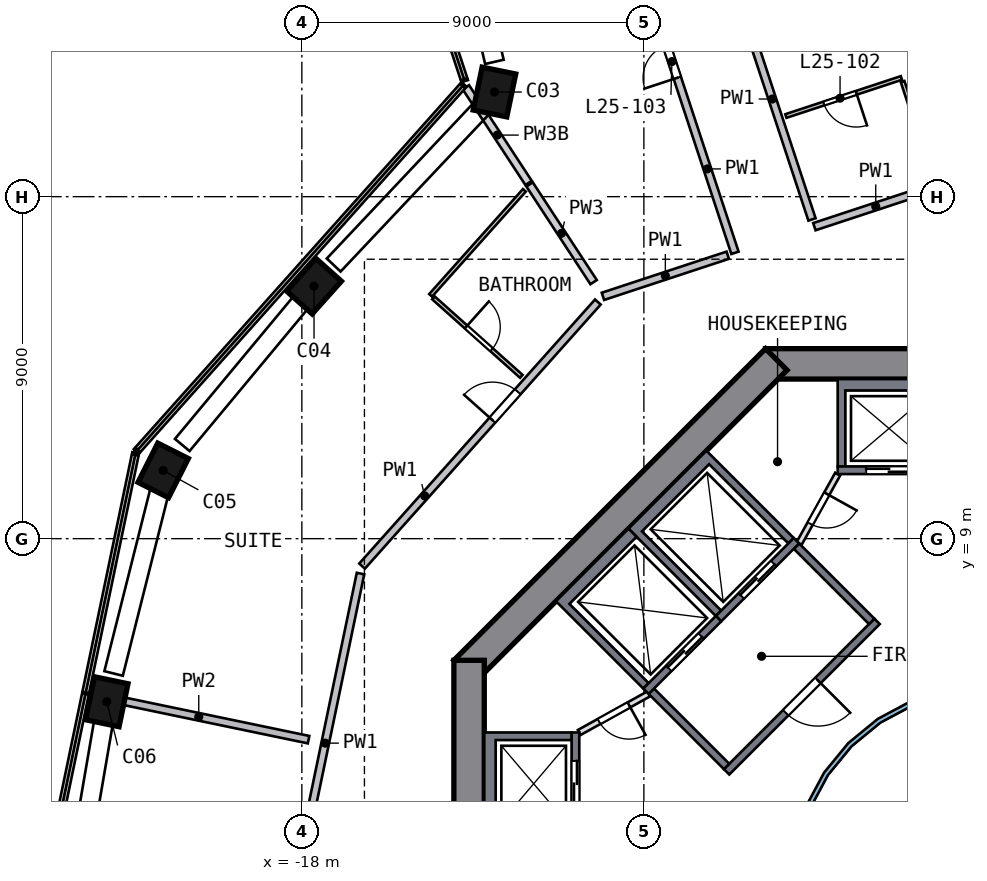
"""IFC4 building model, lengths in metres.
Left out: names, types, materials, properties, quantities, classifications, styles, units other than length and angle.
Written with IfcOpenShell. Run it as: python <this file> out.ifc"""

import sys

from ifc_helpers import new_model, si_unit, direction, frame, frame_2d, origin, origin_2d, place, context, subcontext, project, spatial, polyline, rectangle, outline, extrude, element, fill, save


model = new_model("IFC4")
c1 = context("Model", 3, precision=1e-05, world=origin(), true_north=direction((0.0, 1.0)))
c2 = subcontext(c1, "Body", "Model", "MODEL_VIEW")
j1 = project(units=[si_unit("LENGTHUNIT", "METRE"), si_unit("PLANEANGLEUNIT", "RADIAN")], contexts=[c1])
p1 = place(None, origin())
s1 = spatial("IfcSite", under=j1, at=p1, CompositionType="ELEMENT")
p2 = place(p1, origin())
s2 = spatial("IfcBuilding", under=s1, at=p2, CompositionType="ELEMENT")
p3 = place(p2, frame((0.0, 0.0, 107.0)))
s3 = spatial("IfcBuildingStorey", under=s2, at=p3, CompositionType="ELEMENT", Elevation=107.0)
p4 = place(p3, frame((-12.839, 20.812, 0.0), z_axis=(-0.076771245, -0.048279423, 0.995879146), x_axis=(0.199145695, 0.977958003, 0.062762546)))
e1 = element("IfcColumn", 1, at=p4, inside=s3, PredefinedType="COLUMN", context=c2, shape_type="SweptSolid", body=[
    extrude(rectangle(XDim=1.15, YDim=0.9, at=origin_2d()), origin(), (0.0, 0.0, 1.0), 4.207),
])
p5 = place(p3, frame((-17.61, 15.723, 0.0), z_axis=(-0.057812061, -0.065822166, 0.996155213), x_axis=(-0.663669485, -0.742878568, -0.087602791)))
e2 = element("IfcColumn", 2, at=p5, inside=s3, PredefinedType="COLUMN", context=c2, shape_type="SweptSolid", body=[
    extrude(rectangle(XDim=1.15, YDim=0.9, at=origin_2d()), origin(), (0.0, 0.0, 1.0), 4.206),
])
p6 = place(p3, frame((-21.602, 10.893, 0.0), z_axis=(-0.039752787, -0.080434106, 0.995966902), x_axis=(0.448806667, 0.889113725, 0.089718226)))
e3 = element("IfcColumn", 3, at=p6, inside=s3, PredefinedType="COLUMN", context=c2, shape_type="SweptSolid", body=[
    extrude(rectangle(XDim=1.15, YDim=0.9, at=origin_2d()), origin(), (0.0, 0.0, 1.0), 4.207),
])
p7 = place(p3, frame((-23.113, 4.812, 0.0), z_axis=(-0.017123066, -0.085905551, 0.996156131), x_axis=(-0.20296904, -0.975259529, -0.087592353)))
e4 = element("IfcColumn", 4, at=p7, inside=s3, PredefinedType="COLUMN", context=c2, shape_type="SweptSolid", body=[
    extrude(rectangle(XDim=1.15, YDim=0.9, at=origin_2d()), origin(), (0.0, 0.0, 1.0), 4.206),
])
p8 = place(p3, frame((5.799, 13.6, 0.0), z_axis=(0.0, 0.0, 1.0), x_axis=(-1.0, 0.0, 0.0)))
e5 = element("IfcWall", 5, at=p8, inside=s3, PredefinedType="SHEAR", context=c2, shape_type="SweptSolid", body=[
    extrude(rectangle(XDim=11.598, YDim=0.8, at=frame_2d((5.799, 0.0))), origin(), (0.0, 0.0, 1.0), 4.5),
])
p9 = place(p8, frame((4.899, 0.0, 0.0)))
e6 = element("IfcOpeningElement", 6, at=p9, cuts=e5, PredefinedType="OPENING", context=c2, shape_type="SweptSolid", body=[
    extrude(rectangle(XDim=1.8, YDim=2.1, at=frame_2d((0.9, 1.05))), frame((0.0, 0.41, 0.0), z_axis=(0.0, -1.0, 0.0), x_axis=(1.0, 0.0, 0.0)), (0.0, 0.0, 1.0), 0.82),
])
p10 = place(p3, frame((-5.516, 13.717, 0.0), z_axis=(0.0, 0.0, 1.0), x_axis=(-0.707106781, -0.707106781, 0.0)))
e7 = element("IfcWall", 7, at=p10, inside=s3, PredefinedType="SHEAR", context=c2, shape_type="SweptSolid", body=[
    extrude(rectangle(XDim=11.598, YDim=0.8, at=frame_2d((5.799, 0.0))), origin(), (0.0, 0.0, 1.0), 4.5),
])
p11 = place(p3, frame((-13.6, 5.799, 0.0), z_axis=(0.0, 0.0, 1.0), x_axis=(0.0, -1.0, 0.0)))
e8 = element("IfcWall", 8, at=p11, inside=s3, PredefinedType="SHEAR", context=c2, shape_type="SweptSolid", body=[
    extrude(rectangle(XDim=11.598, YDim=0.8, at=frame_2d((5.799, 0.0))), origin(), (0.0, 0.0, 1.0), 4.5),
])
p12 = place(p11, frame((4.899, 0.0, 0.0)))
e9 = element("IfcOpeningElement", 9, at=p12, cuts=e8, PredefinedType="OPENING", context=c2, shape_type="SweptSolid", body=[
    extrude(rectangle(XDim=1.8, YDim=2.1, at=frame_2d((0.9, 1.05))), frame((0.0, 0.41, 0.0), z_axis=(0.0, -1.0, 0.0), x_axis=(1.0, 0.0, 0.0)), (0.0, 0.0, 1.0), 0.82),
])
p13 = place(p3, origin())
e10 = element("IfcWall", 10, at=p13, inside=s3, PredefinedType="SOLIDWALL", context=c2, shape_type="SweptSolid", body=[
    extrude(outline(polyline([(-3.9, 10.9), (-3.9, 13.2), (-1.2, 13.2), (-1.2, 10.9), (-1.4, 10.9), (-1.4, 12.9), (-3.7, 12.9), (-3.7, 10.9), (-3.9, 10.9)])), origin(), (0.0, 0.0, 1.0), 4.19),
])
p14 = place(p3, frame((-1.2, 10.8, 0.0), z_axis=(0.0, 0.0, 1.0), x_axis=(-1.0, 0.0, 0.0)))
e11 = element("IfcWall", 11, at=p14, inside=s3, PredefinedType="SOLIDWALL", context=c2, shape_type="SweptSolid", body=[
    extrude(rectangle(XDim=2.7, YDim=0.2, at=frame_2d((1.35, 0.0))), origin(), (0.0, 0.0, 1.0), 4.19),
])
p15 = place(p14, frame((0.75, 0.0, 0.0)))
e12 = element("IfcOpeningElement", 12, at=p15, cuts=e11, PredefinedType="OPENING", context=c2, shape_type="SweptSolid", body=[
    extrude(rectangle(XDim=1.2, YDim=2.1, at=frame_2d((0.6, 1.05))), frame((0.0, 0.11, 0.0), z_axis=(0.0, -1.0, 0.0), x_axis=(1.0, 0.0, 0.0)), (0.0, 0.0, 1.0), 0.22),
])
p16 = place(p3, origin())
e13 = element("IfcWall", 13, at=p16, inside=s3, PredefinedType="SOLIDWALL", context=c2, shape_type="SweptSolid", body=[
    extrude(outline(polyline([(-13.2, 3.9), (-10.9, 3.9), (-10.9, 3.7), (-12.9, 3.7), (-12.9, 1.4), (-10.9, 1.4), (-10.9, 1.2), (-13.2, 1.2), (-13.2, 3.9)])), origin(), (0.0, 0.0, 1.0), 4.19),
])
p17 = place(p3, frame((-10.8, 1.2, 0.0), z_axis=(0.0, 0.0, 1.0), x_axis=(0.0, 1.0, 0.0)))
e14 = element("IfcWall", 14, at=p17, inside=s3, PredefinedType="SOLIDWALL", context=c2, shape_type="SweptSolid", body=[
    extrude(rectangle(XDim=2.7, YDim=0.2, at=frame_2d((1.35, 0.0))), origin(), (0.0, 0.0, 1.0), 4.19),
])
p18 = place(p17, frame((0.75, 0.0, 0.0)))
e15 = element("IfcOpeningElement", 15, at=p18, cuts=e14, PredefinedType="OPENING", context=c2, shape_type="SweptSolid", body=[
    extrude(rectangle(XDim=1.2, YDim=2.1, at=frame_2d((0.6, 1.05))), frame((0.0, 0.11, 0.0), z_axis=(0.0, -1.0, 0.0), x_axis=(1.0, 0.0, 0.0)), (0.0, 0.0, 1.0), 0.22),
])
p19 = place(p3, origin())
e16 = element("IfcWall", 16, at=p19, inside=s3, PredefinedType="SOLIDWALL", context=c2, shape_type="SweptSolid", body=[
    extrude(outline(polyline([(-9.405, 9.263), (-7.354, 11.314), (-5.056, 9.016), (-5.197, 8.874), (-7.283, 10.96), (-9.051, 9.192), (-6.965, 7.106), (-7.106, 6.965), (-9.405, 9.263)])), origin(), (0.0, 0.0, 1.0), 4.19),
])
p20 = place(p3, frame((-4.985, 8.945, 0.0), z_axis=(0.0, 0.0, 1.0), x_axis=(-0.707106781, -0.707106781, 0.0)))
e17 = element("IfcWall", 17, at=p20, inside=s3, PredefinedType="SOLIDWALL", context=c2, shape_type="SweptSolid", body=[
    extrude(rectangle(XDim=2.9, YDim=0.2, at=frame_2d((1.45, 0.0))), origin(), (0.0, 0.0, 1.0), 4.19),
])
p21 = place(p20, frame((0.85, 0.0, 0.0)))
e18 = element("IfcOpeningElement", 18, at=p21, cuts=e17, PredefinedType="OPENING", context=c2, shape_type="SweptSolid", body=[
    extrude(rectangle(XDim=1.2, YDim=2.1, at=frame_2d((0.6, 1.05))), frame((0.0, 0.11, 0.0), z_axis=(0.0, -1.0, 0.0), x_axis=(1.0, 0.0, 0.0)), (0.0, 0.0, 1.0), 0.22),
])
p22 = place(p3, origin())
e19 = element("IfcWall", 19, at=p22, inside=s3, PredefinedType="SOLIDWALL", context=c2, shape_type="SweptSolid", body=[
    extrude(outline(polyline([(-11.314, 7.354), (-9.405, 9.263), (-9.192, 9.051), (-10.96, 7.283), (-8.874, 5.197), (-9.016, 5.056), (-11.314, 7.354)])), origin(), (0.0, 0.0, 1.0), 4.19),
])
p23 = place(p3, frame((-7.036, 6.894, 0.0), z_axis=(0.0, 0.0, 1.0), x_axis=(-0.707106781, -0.707106781, 0.0)))
e20 = element("IfcWall", 20, at=p23, inside=s3, PredefinedType="SOLIDWALL", context=c2, shape_type="SweptSolid", body=[
    extrude(rectangle(XDim=2.7, YDim=0.2, at=frame_2d((1.35, 0.0))), origin(), (0.0, 0.0, 1.0), 4.19),
])
p24 = place(p23, frame((0.65, 0.0, 0.0)))
e21 = element("IfcOpeningElement", 21, at=p24, cuts=e20, PredefinedType="OPENING", context=c2, shape_type="SweptSolid", body=[
    extrude(rectangle(XDim=1.2, YDim=2.1, at=frame_2d((0.6, 1.05))), frame((0.0, 0.11, 0.0), z_axis=(0.0, -1.0, 0.0), x_axis=(1.0, 0.0, 0.0)), (0.0, 0.0, 1.0), 0.22),
])
p25 = place(p3, frame((-2.864, 6.823, 0.0), z_axis=(0.0, 0.0, 1.0), x_axis=(-0.707106781, -0.707106781, 0.0)))
e22 = element("IfcWall", 22, at=p25, inside=s3, PredefinedType="SOLIDWALL", context=c2, shape_type="SweptSolid", body=[
    extrude(rectangle(XDim=5.6, YDim=0.2, at=frame_2d((2.8, 0.0))), origin(), (0.0, 0.0, 1.0), 4.19),
])
p26 = place(p25, frame((2.2, 0.0, 0.0)))
e23 = element("IfcOpeningElement", 23, at=p26, cuts=e22, PredefinedType="OPENING", context=c2, shape_type="SweptSolid", body=[
    extrude(rectangle(XDim=1.2, YDim=2.1, at=frame_2d((0.6, 1.05))), frame((0.0, 0.11, 0.0), z_axis=(0.0, -1.0, 0.0), x_axis=(1.0, 0.0, 0.0)), (0.0, 0.0, 1.0), 0.22),
])
for number, where, z_axis, x_axis in (
    (24, (-3.005, 6.823, 0.0), (0.0, 0.0, 1.0), (-0.707, 0.707, 0.0)),
    (25, (-6.823, 3.005, 0.0), (0.0, 0.0, 1.0), (-0.707, 0.707, 0.0)),
):
    element("IfcWall", number, at=place(p3, frame(where, z_axis=z_axis, x_axis=x_axis)), inside=s3, PredefinedType="SOLIDWALL", context=c2, shape_type="SweptSolid", body=[
        extrude(rectangle(XDim=2.8, YDim=0.2, at=frame_2d((1.4, 0.0))), origin(), (0.0, 0.0, 1.0), 4.19),
    ])
p27 = place(p3, frame((-3.9, 10.7, 0.0), z_axis=(0.0, 0.0, 1.0), x_axis=(-0.485692555, -0.874129705, 0.0)))
e26 = element("IfcWall", 26, at=p27, inside=s3, PredefinedType="PARTITIONING", context=c2, shape_type="SweptSolid", body=[
    extrude(rectangle(XDim=2.089, YDim=0.15, at=frame_2d((1.044, 0.0))), origin(), (0.0, 0.0, 1.0), 4.19),
])
p28 = place(p27, frame((0.594, 0.0, 0.0)))
e27 = element("IfcOpeningElement", 27, at=p28, cuts=e26, PredefinedType="OPENING", context=c2, shape_type="SweptSolid", body=[
    extrude(rectangle(XDim=0.9, YDim=2.1, at=frame_2d((0.45, 1.05))), frame((0.0, 0.085, 0.0), z_axis=(0.0, -1.0, 0.0), x_axis=(1.0, 0.0, 0.0)), (0.0, 0.0, 1.0), 0.17),
])
p29 = place(p3, frame((-8.874, 4.914, 0.0), z_axis=(0.0, 0.0, 1.0), x_axis=(-0.874129705, -0.485692555, 0.0)))
e28 = element("IfcWall", 28, at=p29, inside=s3, PredefinedType="PARTITIONING", context=c2, shape_type="SweptSolid", body=[
    extrude(rectangle(XDim=2.089, YDim=0.15, at=frame_2d((1.044, 0.0))), origin(), (0.0, 0.0, 1.0), 4.19),
])
p30 = place(p29, frame((0.594, 0.0, 0.0)))
e29 = element("IfcOpeningElement", 29, at=p30, cuts=e28, PredefinedType="OPENING", context=c2, shape_type="SweptSolid", body=[
    extrude(rectangle(XDim=0.9, YDim=2.1, at=frame_2d((0.45, 1.05))), frame((0.0, 0.085, 0.0), z_axis=(0.0, -1.0, 0.0), x_axis=(1.0, 0.0, 0.0)), (0.0, 0.0, 1.0), 0.17),
])
p31 = place(p3, origin())
e30 = element("IfcWall", 30, at=p31, inside=s3, PredefinedType="SOLIDWALL", context=c2, shape_type="SweptSolid", body=[
    extrude(outline(polyline([(5.021, -0.999), (4.73, -1.959), (4.257, -2.844), (3.62, -3.62), (2.844, -4.257), (1.959, -4.73), (0.999, -5.021), (0.0, -5.12), (-0.999, -5.021), (-1.959, -4.73), (-2.844, -4.257), (-3.62, -3.62), (-4.257, -2.844), (-4.73, -1.959), (-5.021, -0.999), (-5.12, 0.0), (-5.021, 0.999), (-4.73, 1.959), (-4.257, 2.844), (-3.62, 3.62), (-2.844, 4.257), (-1.959, 4.73), (-0.999, 5.021), (0.0, 5.12), (0.999, 5.021), (1.959, 4.73), (2.844, 4.257), (3.62, 3.62), (4.257, 2.844), (4.73, 1.959), (5.021, 0.999), (5.12, 0.0), (5.021, -0.999)]), holes=[polyline([(4.904, 0.976), (4.619, 1.913), (4.157, 2.778), (3.535, 3.535), (2.778, 4.157), (1.913, 4.619), (0.976, 4.904), (0.0, 5.0), (-0.976, 4.904), (-1.913, 4.619), (-2.778, 4.157), (-3.535, 3.535), (-4.157, 2.778), (-4.619, 1.913), (-4.904, 0.976), (-5.0, 0.0), (-4.904, -0.976), (-4.619, -1.913), (-4.157, -2.778), (-3.535, -3.535), (-2.778, -4.157), (-1.913, -4.619), (-0.976, -4.904), (0.0, -5.0), (0.976, -4.904), (1.913, -4.619), (2.778, -4.157), (3.535, -3.535), (4.157, -2.778), (4.619, -1.913), (4.904, -0.976), (5.0, 0.0), (4.904, 0.976)])]), origin(), (0.0, 0.0, 1.0), 4.19),
])
p32 = place(p3, frame((-16.457, 8.082, 0.0), z_axis=(0.0, 0.0, 1.0), x_axis=(-0.203815215, -0.979009376, 0.0)))
e31 = element("IfcWall", 31, at=p32, inside=s3, PredefinedType="SOLIDWALL", context=c2, shape_type="SweptSolid", body=[
    extrude(rectangle(XDim=9.116, YDim=0.2, at=frame_2d((4.558, 0.0))), origin(), (0.0, 0.0, 1.0), 4.19),
])
p33 = place(p3, frame((-16.415, 8.278, 0.0), z_axis=(0.0, 0.0, 1.0), x_axis=(0.666011603, 0.745941381, 0.0)))
e32 = element("IfcWall", 32, at=p33, inside=s3, PredefinedType="SOLIDWALL", context=c2, shape_type="SweptSolid", body=[
    extrude(rectangle(XDim=9.316, YDim=0.2, at=frame_2d((4.658, 0.0))), origin(), (0.0, 0.0, 1.0), 4.19),
])
p34 = place(p33, frame((5.15, 0.0, 0.0)))
e33 = element("IfcOpeningElement", 33, at=p34, cuts=e32, PredefinedType="OPENING", context=c2, shape_type="SweptSolid", body=[
    extrude(rectangle(XDim=1.0, YDim=2.1, at=frame_2d((0.5, 1.05))), frame((0.0, 0.11, 0.0), z_axis=(0.0, -1.0, 0.0), x_axis=(1.0, 0.0, 0.0)), (0.0, 0.0, 1.0), 0.22),
])
p35 = place(p3, frame((-6.793, 16.459, 0.0), z_axis=(0.0, 0.0, 1.0), x_axis=(-0.949764912, -0.312964235, 0.0)))
e34 = element("IfcWall", 34, at=p35, inside=s3, PredefinedType="SOLIDWALL", context=c2, shape_type="SweptSolid", body=[
    extrude(rectangle(XDim=3.458, YDim=0.2, at=frame_2d((1.729, 0.0))), origin(), (0.0, 0.0, 1.0), 4.19),
])
p36 = place(p3, frame((-6.603, 16.522, 0.0), z_axis=(0.0, 0.0, 1.0), x_axis=(-0.313005391, 0.949751349, 0.0)))
e35 = element("IfcWall", 35, at=p36, inside=s3, PredefinedType="SOLIDWALL", context=c2, shape_type="SweptSolid", body=[
    extrude(rectangle(XDim=10.575, YDim=0.2, at=frame_2d((5.288, 0.0))), origin(), (0.0, 0.0, 1.0), 4.19),
])
p37 = place(p36, frame((4.85, 0.0, 0.0)))
e36 = element("IfcOpeningElement", 36, at=p37, cuts=e35, PredefinedType="OPENING", context=c2, shape_type="SweptSolid", body=[
    extrude(rectangle(XDim=0.9, YDim=2.1, at=frame_2d((0.45, 1.05))), frame((0.0, 0.11, 0.0), z_axis=(0.0, -1.0, 0.0), x_axis=(1.0, 0.0, 0.0)), (0.0, 0.0, 1.0), 0.22),
])
p38 = place(p3, frame((-7.823, 27.252, 0.0), z_axis=(0.0, 0.0, 1.0), x_axis=(0.31300621, -0.949751079, 0.0)))
e37 = element("IfcWall", 37, at=p38, inside=s3, PredefinedType="SOLIDWALL", context=c2, shape_type="SweptSolid", body=[
    extrude(rectangle(XDim=10.373, YDim=0.2, at=frame_2d((5.187, 0.0))), origin(), (0.0, 0.0, 1.0), 4.19),
])
p39 = place(p38, frame((2.5, 0.0, 0.0)))
e38 = element("IfcOpeningElement", 38, at=p39, cuts=e37, PredefinedType="OPENING", context=c2, shape_type="SweptSolid", body=[
    extrude(rectangle(XDim=1.0, YDim=2.1, at=frame_2d((0.5, 1.05))), frame((0.0, 0.11, 0.0), z_axis=(0.0, -1.0, 0.0), x_axis=(1.0, 0.0, 0.0)), (0.0, 0.0, 1.0), 0.22),
])
p40 = place(p3, frame((-1.284, 18.274, 0.0), z_axis=(0.0, 0.0, 1.0), x_axis=(-0.94976917, -0.312951311, 0.0)))
e39 = element("IfcWall", 39, at=p40, inside=s3, PredefinedType="SOLIDWALL", context=c2, shape_type="SweptSolid", body=[
    extrude(rectangle(XDim=3.4, YDim=0.2, at=frame_2d((1.7, 0.0))), origin(), (0.0, 0.0, 1.0), 4.19),
])
p41 = place(p3, frame((-23.602, 4.914, 0.0), z_axis=(0.0, 0.0, 1.0), x_axis=(0.979007251, -0.203825422, 0.0)))
e40 = element("IfcWall", 40, at=p41, inside=s3, PredefinedType="SOLIDWALL", context=c2, shape_type="SweptSolid", body=[
    extrude(rectangle(XDim=5.903, YDim=0.2, at=frame_2d((2.951, 0.0))), origin(), (0.0, 0.0, 1.0), 4.19),
])
p42 = place(p3, frame((-14.537, 15.337, 0.0), z_axis=(0.0, 0.0, 1.0), x_axis=(0.745947444, -0.666004813, 0.0)))
e41 = element("IfcWall", 41, at=p42, inside=s3, PredefinedType="PARTITIONING", context=c2, shape_type="SweptSolid", body=[
    extrude(rectangle(XDim=3.1, YDim=0.1, at=frame_2d((1.55, 0.0))), origin(), (0.0, 0.0, 1.0), 4.19),
])
p43 = place(p42, frame((1.15, 0.0, 0.0)))
e42 = element("IfcOpeningElement", 42, at=p43, cuts=e41, PredefinedType="OPENING", context=c2, shape_type="SweptSolid", body=[
    extrude(rectangle(XDim=0.9, YDim=2.1, at=frame_2d((0.45, 1.05))), frame((0.0, 0.06, 0.0), z_axis=(0.0, -1.0, 0.0), x_axis=(1.0, 0.0, 0.0)), (0.0, 0.0, 1.0), 0.12),
])
p44 = place(p3, frame((-14.612, 15.403, 0.0), z_axis=(0.0, 0.0, 1.0), x_axis=(0.665998741, 0.745952865, 0.0)))
e43 = element("IfcWall", 43, at=p44, inside=s3, PredefinedType="PARTITIONING", context=c2, shape_type="SweptSolid", body=[
    extrude(rectangle(XDim=3.704, YDim=0.1, at=frame_2d((1.852, 0.0))), origin(), (0.0, 0.0, 1.0), 4.19),
])
p45 = place(p3, frame((-2.223, 21.124, 0.0), z_axis=(0.0, 0.0, 1.0), x_axis=(-0.949768639, -0.312952924, 0.0)))
e44 = element("IfcWall", 44, at=p45, inside=s3, PredefinedType="PARTITIONING", context=c2, shape_type="SweptSolid", body=[
    extrude(rectangle(XDim=3.2, YDim=0.1, at=frame_2d((1.6, 0.0))), origin(), (0.0, 0.0, 1.0), 4.19),
])
p46 = place(p45, frame((1.25, 0.0, 0.0)))
e45 = element("IfcOpeningElement", 45, at=p46, cuts=e44, PredefinedType="OPENING", context=c2, shape_type="SweptSolid", body=[
    extrude(rectangle(XDim=0.9, YDim=2.1, at=frame_2d((0.45, 1.05))), frame((0.0, 0.06, 0.0), z_axis=(0.0, -1.0, 0.0), x_axis=(1.0, 0.0, 0.0)), (0.0, 0.0, 1.0), 0.12),
])
p47 = place(p3, frame((-2.192, 21.029, 0.0), z_axis=(0.0, 0.0, 1.0), x_axis=(0.313052071, -0.949735964, 0.0)))
e46 = element("IfcWall", 46, at=p47, inside=s3, PredefinedType="PARTITIONING", context=c2, shape_type="SweptSolid", body=[
    extrude(rectangle(XDim=2.7, YDim=0.1, at=frame_2d((1.35, 0.0))), origin(), (0.0, 0.0, 1.0), 4.19),
])
p48 = place(p3, frame((-12.033, 18.361, 0.0), z_axis=(0.0, 0.0, 1.0), x_axis=(-0.548210107, 0.836340648, 0.0)))
e47 = element("IfcWall", 47, at=p48, inside=s3, PredefinedType="SOLIDWALL", context=c2, shape_type="SweptSolid", body=[
    extrude(rectangle(XDim=3.011, YDim=0.2, at=frame_2d((1.506, 0.0))), origin(), (0.0, 0.0, 1.0), 3.69),
])
p49 = place(p3, frame((-10.323, 15.751, 0.0), z_axis=(0.0, 0.0, 1.0), x_axis=(-0.548104797, 0.836409667, 0.0)))
e48 = element("IfcWall", 48, at=p49, inside=s3, PredefinedType="SOLIDWALL", context=c2, shape_type="SweptSolid", body=[
    extrude(rectangle(XDim=3.075, YDim=0.2, at=frame_2d((1.537, 0.0))), origin(), (0.0, 0.0, 1.0), 4.19),
])
p50 = place(p15, origin())
e49 = element("IfcDoor", 49, at=p50, inside=s3, OperationType="DOUBLE_DOOR_SLIDING", PredefinedType="DOOR", context=c2, shape_type="SweptSolid", body=[
    extrude(rectangle(XDim=1.2, YDim=2.1, at=frame_2d((0.6, 1.05))), frame((0.0, 0.025, 0.0), z_axis=(0.0, -1.0, 0.0), x_axis=(1.0, 0.0, 0.0)), (0.0, 0.0, 1.0), 0.05),
])
fill(e12, e49)
p51 = place(p18, origin())
e50 = element("IfcDoor", 50, at=p51, inside=s3, OperationType="DOUBLE_DOOR_SLIDING", PredefinedType="DOOR", context=c2, shape_type="SweptSolid", body=[
    extrude(rectangle(XDim=1.2, YDim=2.1, at=frame_2d((0.6, 1.05))), frame((0.0, 0.025, 0.0), z_axis=(0.0, -1.0, 0.0), x_axis=(1.0, 0.0, 0.0)), (0.0, 0.0, 1.0), 0.05),
])
fill(e15, e50)
p52 = place(p21, origin())
e51 = element("IfcDoor", 51, at=p52, inside=s3, OperationType="DOUBLE_DOOR_SLIDING", PredefinedType="DOOR", context=c2, shape_type="SweptSolid", body=[
    extrude(rectangle(XDim=1.2, YDim=2.1, at=frame_2d((0.6, 1.05))), frame((0.0, 0.025, 0.0), z_axis=(0.0, -1.0, 0.0), x_axis=(1.0, 0.0, 0.0)), (0.0, 0.0, 1.0), 0.05),
])
fill(e18, e51)
p53 = place(p24, origin())
e52 = element("IfcDoor", 52, at=p53, inside=s3, OperationType="DOUBLE_DOOR_SLIDING", PredefinedType="DOOR", context=c2, shape_type="SweptSolid", body=[
    extrude(rectangle(XDim=1.2, YDim=2.1, at=frame_2d((0.6, 1.05))), frame((0.0, 0.025, 0.0), z_axis=(0.0, -1.0, 0.0), x_axis=(1.0, 0.0, 0.0)), (0.0, 0.0, 1.0), 0.05),
])
fill(e21, e52)
p54 = place(p26, origin())
e53 = element("IfcDoor", 53, at=p54, inside=s3, OperationType="SINGLE_SWING_LEFT", PredefinedType="DOOR", context=c2, shape_type="SweptSolid", body=[
    extrude(rectangle(XDim=1.2, YDim=2.1, at=frame_2d((0.6, 1.05))), frame((0.0, 0.025, 0.0), z_axis=(0.0, -1.0, 0.0), x_axis=(1.0, 0.0, 0.0)), (0.0, 0.0, 1.0), 0.05),
])
fill(e23, e53)
p55 = place(p28, origin())
e54 = element("IfcDoor", 54, at=p55, inside=s3, OperationType="SINGLE_SWING_LEFT", PredefinedType="DOOR", context=c2, shape_type="SweptSolid", body=[
    extrude(rectangle(XDim=0.9, YDim=2.1, at=frame_2d((0.45, 1.05))), frame((0.0, 0.025, 0.0), z_axis=(0.0, -1.0, 0.0), x_axis=(1.0, 0.0, 0.0)), (0.0, 0.0, 1.0), 0.05),
])
fill(e27, e54)
p56 = place(p30, origin())
e55 = element("IfcDoor", 55, at=p56, inside=s3, OperationType="SINGLE_SWING_LEFT", PredefinedType="DOOR", context=c2, shape_type="SweptSolid", body=[
    extrude(rectangle(XDim=0.9, YDim=2.1, at=frame_2d((0.45, 1.05))), frame((0.0, 0.025, 0.0), z_axis=(0.0, -1.0, 0.0), x_axis=(1.0, 0.0, 0.0)), (0.0, 0.0, 1.0), 0.05),
])
fill(e29, e55)
p57 = place(p46, origin())
e56 = element("IfcDoor", 56, at=p57, inside=s3, OperationType="SINGLE_SWING_LEFT", PredefinedType="DOOR", context=c2, shape_type="SweptSolid", body=[
    extrude(rectangle(XDim=0.9, YDim=2.1, at=frame_2d((0.45, 1.05))), frame((0.0, 0.025, 0.0), z_axis=(0.0, -1.0, 0.0), x_axis=(1.0, 0.0, 0.0)), (0.0, 0.0, 1.0), 0.05),
])
fill(e45, e56)
p58 = place(p37, origin())
e57 = element("IfcDoor", 57, at=p58, inside=s3, OperationType="SINGLE_SWING_LEFT", PredefinedType="DOOR", context=c2, shape_type="SweptSolid", body=[
    extrude(rectangle(XDim=0.9, YDim=2.1, at=frame_2d((0.45, 1.05))), frame((0.0, 0.025, 0.0), z_axis=(0.0, -1.0, 0.0), x_axis=(1.0, 0.0, 0.0)), (0.0, 0.0, 1.0), 0.05),
])
fill(e36, e57)
p59 = place(p34, origin())
e58 = element("IfcDoor", 58, at=p59, inside=s3, OperationType="SINGLE_SWING_LEFT", PredefinedType="DOOR", context=c2, shape_type="SweptSolid", body=[
    extrude(rectangle(XDim=1.0, YDim=2.1, at=frame_2d((0.5, 1.05))), frame((0.0, 0.025, 0.0), z_axis=(0.0, -1.0, 0.0), x_axis=(1.0, 0.0, 0.0)), (0.0, 0.0, 1.0), 0.05),
])
fill(e33, e58)
p60 = place(p43, origin())
e59 = element("IfcDoor", 59, at=p60, inside=s3, OperationType="SINGLE_SWING_LEFT", PredefinedType="DOOR", context=c2, shape_type="SweptSolid", body=[
    extrude(rectangle(XDim=0.9, YDim=2.1, at=frame_2d((0.45, 1.05))), frame((0.0, 0.025, 0.0), z_axis=(0.0, -1.0, 0.0), x_axis=(1.0, 0.0, 0.0)), (0.0, 0.0, 1.0), 0.05),
])
fill(e42, e59)
save(model, sys.argv[1])
